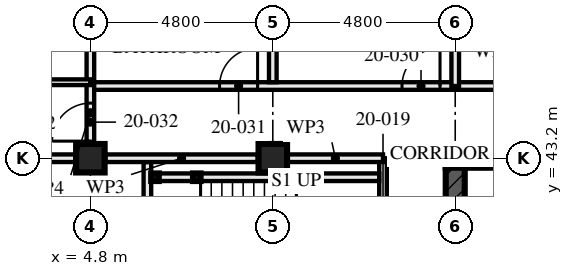
"""IFC4 building model, lengths in metres.
Left out: names, types, materials, properties, quantities, classifications, styles, units other than length and angle.
Written with IfcOpenShell. Run it as: python <this file> out.ifc"""

import sys

from ifc_helpers import new_model, si_unit, direction, frame, frame_2d, origin, origin_2d, place, context, subcontext, project, spatial, rectangle, hollow_rectangle, extrude, element, fill, save


model = new_model("IFC4")
c1 = context("Model", 3, precision=1e-05, world=origin(), true_north=direction((0.0, 1.0)))
c2 = subcontext(c1, "Body", "Model", "MODEL_VIEW")
j1 = project(units=[si_unit("LENGTHUNIT", "METRE"), si_unit("PLANEANGLEUNIT", "RADIAN")], contexts=[c1])
p1 = place(None, origin())
s1 = spatial("IfcSite", under=j1, at=p1, CompositionType="ELEMENT")
p2 = place(p1, origin())
s2 = spatial("IfcBuilding", under=s1, at=p2, CompositionType="ELEMENT")
p3 = place(p2, frame((0.0, 0.0, 76.0)))
s3 = spatial("IfcBuildingStorey", under=s2, at=p3, CompositionType="ELEMENT", Elevation=76.0)
for number, where, z_axis, x_axis in (
    (1, (4.8, 43.2, 0.0), (0.0, 0.0, 1.0), (0.0, 1.0, 0.0)),
    (2, (9.6, 43.2, 0.0), (0.0, 0.0, 1.0), (0.0, 1.0, 0.0)),
):
    element("IfcColumn", number, at=place(p3, frame(where, z_axis=z_axis, x_axis=x_axis)), inside=s3, PredefinedType="COLUMN", context=c2, shape_type="SweptSolid", body=[
        extrude(hollow_rectangle(XDim=0.75, YDim=0.75, WallThickness=0.08, at=origin_2d()), origin(), (0.0, 0.0, 1.0), 3.5),
    ])
p4 = place(p3, frame((29.05, 43.2, -0.17), z_axis=(0.0, 0.0, 1.0), x_axis=(-1.0, 0.0, 0.0)))
e3 = element("IfcWall", 3, at=p4, inside=s3, PredefinedType="SHEAR", context=c2, shape_type="SweptSolid", body=[
    extrude(rectangle(XDim=14.9, YDim=0.5, at=frame_2d((7.45, 0.0))), origin(), (0.0, 0.0, 1.0), 3.42),
])
p5 = place(p4, frame((6.85, 0.0, 0.17)))
e4 = element("IfcOpeningElement", 4, at=p5, cuts=e3, PredefinedType="OPENING", context=c2, shape_type="SweptSolid", body=[
    extrude(rectangle(XDim=1.2, YDim=2.1, at=frame_2d((0.6, 1.05))), frame((0.0, 0.26, 0.0), z_axis=(0.0, -1.0, 0.0), x_axis=(1.0, 0.0, 0.0)), (0.0, 0.0, 1.0), 0.521),
])
p6 = place(p3, frame((14.4, 42.95, -0.17), z_axis=(0.0, 0.0, 1.0), x_axis=(0.0, -1.0, 0.0)))
e5 = element("IfcWall", 5, at=p6, inside=s3, PredefinedType="SHEAR", context=c2, shape_type="SweptSolid", body=[
    extrude(rectangle(XDim=13.9, YDim=0.5, at=frame_2d((6.95, 0.0))), origin(), (0.0, 0.0, 1.0), 3.42),
])
p7 = place(p6, frame((6.35, 0.0, 0.17)))
e6 = element("IfcOpeningElement", 6, at=p7, cuts=e5, PredefinedType="OPENING", context=c2, shape_type="SweptSolid", body=[
    extrude(rectangle(XDim=1.2, YDim=2.1, at=frame_2d((0.6, 1.05))), frame((0.0, 0.26, 0.0), z_axis=(0.0, -1.0, 0.0), x_axis=(1.0, 0.0, 0.0)), (0.0, 0.0, 1.0), 0.521),
])
for number, where, z_axis, x_axis in (
    (7, (6.5, 42.7, 0.0), (0.0, 0.0, 1.0), (1.0, 0.0, 0.0)),
    (8, (7.6, 42.7, 0.0), (0.0, 0.0, 1.0), (1.0, 0.0, 0.0)),
):
    element("IfcColumn", number, at=place(p3, frame(where, z_axis=z_axis, x_axis=x_axis)), inside=s3, PredefinedType="COLUMN", context=c2, shape_type="SweptSolid", body=[
        extrude(hollow_rectangle(XDim=0.2, YDim=0.2, WallThickness=0.008, at=origin_2d()), origin(), (0.0, 0.0, 1.0), 3.25),
    ])
p8 = place(p3, frame((6.6, 42.7, 0.0), z_axis=(0.0, 0.0, 1.0), x_axis=(1.0, 0.0, 0.0)))
e9 = element("IfcWall", 9, at=p8, inside=s3, PredefinedType="SOLIDWALL", context=c2, shape_type="SweptSolid", body=[
    extrude(rectangle(XDim=0.9, YDim=0.2, at=frame_2d((0.45, 0.0))), origin(), (0.0, 0.0, 1.0), 2.94),
])
p9 = place(p3, frame((7.7, 42.7, 0.0), z_axis=(0.0, 0.0, 1.0), x_axis=(1.0, 0.0, 0.0)))
e10 = element("IfcWall", 10, at=p9, inside=s3, PredefinedType="SOLIDWALL", context=c2, shape_type="SweptSolid", body=[
    extrude(rectangle(XDim=4.7, YDim=0.2, at=frame_2d((2.35, 0.0))), origin(), (0.0, 0.0, 1.0), 2.94),
])
p10 = place(p3, frame((6.3, 43.1, 0.0), z_axis=(0.0, 0.0, 1.0), x_axis=(0.0, -1.0, 0.0)))
e11 = element("IfcWall", 11, at=p10, inside=s3, PredefinedType="SOLIDWALL", context=c2, shape_type="SweptSolid", body=[
    extrude(rectangle(XDim=3.3, YDim=0.2, at=frame_2d((1.65, 0.0))), origin(), (0.0, 0.0, 1.0), 3.25),
])
p11 = place(p3, frame((12.5, 43.2, 0.0), z_axis=(0.0, 0.0, 1.0), x_axis=(0.0, -1.0, 0.0)))
e12 = element("IfcWall", 12, at=p11, inside=s3, PredefinedType="PARTITIONING", context=c2, shape_type="SweptSolid", body=[
    extrude(rectangle(XDim=14.4, YDim=0.2, at=frame_2d((7.2, 0.0))), origin(), (0.0, 0.0, 1.0), 2.04),
])
p12 = place(p11, frame((1.4, 0.0, 0.0)))
e13 = element("IfcOpeningElement", 13, at=p12, cuts=e12, PredefinedType="OPENING", context=c2, shape_type="SweptSolid", body=[
    extrude(rectangle(XDim=1.0, YDim=2.0, at=frame_2d((0.5, 1.0))), frame((0.0, 0.111, 0.0), z_axis=(0.0, -1.0, 0.0), x_axis=(1.0, 0.0, 0.0)), (0.0, 0.0, 1.0), 0.221),
])
p13 = place(p11, frame((5.2, 0.0, 0.0)))
e14 = element("IfcOpeningElement", 14, at=p13, cuts=e12, PredefinedType="OPENING", context=c2, shape_type="SweptSolid", body=[
    extrude(rectangle(XDim=1.0, YDim=2.0, at=frame_2d((0.5, 1.0))), frame((0.0, 0.111, 0.0), z_axis=(0.0, -1.0, 0.0), x_axis=(1.0, 0.0, 0.0)), (0.0, 0.0, 1.0), 0.221),
])
p14 = place(p11, frame((10.0, 0.0, 0.0)))
e15 = element("IfcOpeningElement", 15, at=p14, cuts=e12, PredefinedType="OPENING", context=c2, shape_type="SweptSolid", body=[
    extrude(rectangle(XDim=1.0, YDim=2.0, at=frame_2d((0.5, 1.0))), frame((0.0, 0.111, 0.0), z_axis=(0.0, -1.0, 0.0), x_axis=(1.0, 0.0, 0.0)), (0.0, 0.0, 1.0), 0.221),
])
p15 = place(p3, frame((9.6, 57.28, 0.0), z_axis=(0.0, 0.0, 1.0), x_axis=(0.0, -1.0, 0.0)))
e16 = element("IfcWall", 16, at=p15, inside=s3, PredefinedType="PARTITIONING", context=c2, shape_type="SweptSolid", body=[
    extrude(rectangle(XDim=12.08, YDim=0.2, at=frame_2d((6.04, 0.0))), origin(), (0.0, 0.0, 1.0), 2.04),
])
p16 = place(p3, frame((4.8, 52.48, 0.0), z_axis=(0.0, 0.0, 1.0), x_axis=(0.0, -1.0, 0.0)))
e17 = element("IfcWall", 17, at=p16, inside=s3, PredefinedType="PARTITIONING", context=c2, shape_type="SweptSolid", body=[
    extrude(rectangle(XDim=7.28, YDim=0.2, at=frame_2d((3.64, 0.0))), origin(), (0.0, 0.0, 1.0), 2.04),
])
p17 = place(p3, frame((4.8, 45.2, 0.0), z_axis=(0.0, 0.0, 1.0), x_axis=(-1.0, 0.0, 0.0)))
e18 = element("IfcWall", 18, at=p17, inside=s3, PredefinedType="PARTITIONING", context=c2, shape_type="SweptSolid", body=[
    extrude(rectangle(XDim=2.8, YDim=0.15, at=frame_2d((1.4, 0.0))), origin(), (0.0, 0.0, 1.0), 3.25),
])
p18 = place(p3, frame((14.4, 45.1, 0.0), z_axis=(0.0, 0.0, 1.0), x_axis=(-1.0, 0.0, 0.0)))
e19 = element("IfcWall", 19, at=p18, inside=s3, PredefinedType="PARTITIONING", context=c2, shape_type="SweptSolid", body=[
    extrude(rectangle(XDim=9.6, YDim=0.2, at=frame_2d((4.8, 0.0))), origin(), (0.0, 0.0, 1.0), 3.25),
])
p19 = place(p18, frame((0.4, 0.0, 0.0)))
e20 = element("IfcOpeningElement", 20, at=p19, cuts=e19, PredefinedType="OPENING", context=c2, shape_type="SweptSolid", body=[
    extrude(rectangle(XDim=1.0, YDim=2.1, at=frame_2d((0.5, 1.05))), frame((0.0, 0.111, 0.0), z_axis=(0.0, -1.0, 0.0), x_axis=(1.0, 0.0, 0.0)), (0.0, 0.0, 1.0), 0.221),
])
p20 = place(p18, frame((5.2, 0.0, 0.0)))
e21 = element("IfcOpeningElement", 21, at=p20, cuts=e19, PredefinedType="OPENING", context=c2, shape_type="SweptSolid", body=[
    extrude(rectangle(XDim=1.0, YDim=2.1, at=frame_2d((0.5, 1.05))), frame((0.0, 0.111, 0.0), z_axis=(0.0, -1.0, 0.0), x_axis=(1.0, 0.0, 0.0)), (0.0, 0.0, 1.0), 0.221),
])
p21 = place(p3, frame((4.8, 45.2, 0.0), z_axis=(0.0, 0.0, 1.0), x_axis=(0.0, -1.0, 0.0)))
e22 = element("IfcWall", 22, at=p21, inside=s3, PredefinedType="PARTITIONING", context=c2, shape_type="SweptSolid", body=[
    extrude(rectangle(XDim=1.605, YDim=0.2, at=frame_2d((0.802, 0.0))), origin(), (0.0, 0.0, 1.0), 3.25),
])
p22 = place(p21, frame((0.55, 0.0, 0.0)))
e23 = element("IfcOpeningElement", 23, at=p22, cuts=e22, PredefinedType="OPENING", context=c2, shape_type="SweptSolid", body=[
    extrude(rectangle(XDim=1.0, YDim=2.1, at=frame_2d((0.5, 1.05))), frame((0.0, 0.111, 0.0), z_axis=(0.0, -1.0, 0.0), x_axis=(1.0, 0.0, 0.0)), (0.0, 0.0, 1.0), 0.221),
])
p23 = place(p3, frame((28.8, 45.1, 0.0), z_axis=(0.0, 0.0, 1.0), x_axis=(-1.0, 0.0, 0.0)))
e24 = element("IfcWall", 24, at=p23, inside=s3, PredefinedType="PARTITIONING", context=c2, shape_type="SweptSolid", body=[
    extrude(rectangle(XDim=14.4, YDim=0.2, at=frame_2d((7.2, 0.0))), origin(), (0.0, 0.0, 1.0), 3.25),
])
p24 = place(p23, frame((0.4, 0.0, 0.0)))
e25 = element("IfcOpeningElement", 25, at=p24, cuts=e24, PredefinedType="OPENING", context=c2, shape_type="SweptSolid", body=[
    extrude(rectangle(XDim=1.0, YDim=2.1, at=frame_2d((0.5, 1.05))), frame((0.0, 0.111, 0.0), z_axis=(0.0, -1.0, 0.0), x_axis=(1.0, 0.0, 0.0)), (0.0, 0.0, 1.0), 0.221),
])
p25 = place(p23, frame((5.2, 0.0, 0.0)))
e26 = element("IfcOpeningElement", 26, at=p25, cuts=e24, PredefinedType="OPENING", context=c2, shape_type="SweptSolid", body=[
    extrude(rectangle(XDim=1.0, YDim=2.1, at=frame_2d((0.5, 1.05))), frame((0.0, 0.111, 0.0), z_axis=(0.0, -1.0, 0.0), x_axis=(1.0, 0.0, 0.0)), (0.0, 0.0, 1.0), 0.221),
])
p26 = place(p23, frame((10.0, 0.0, 0.0)))
e27 = element("IfcOpeningElement", 27, at=p26, cuts=e24, PredefinedType="OPENING", context=c2, shape_type="SweptSolid", body=[
    extrude(rectangle(XDim=1.0, YDim=2.1, at=frame_2d((0.5, 1.05))), frame((0.0, 0.111, 0.0), z_axis=(0.0, -1.0, 0.0), x_axis=(1.0, 0.0, 0.0)), (0.0, 0.0, 1.0), 0.221),
])
p27 = place(p3, frame((12.5, 43.2, 0.0), z_axis=(0.0, 0.0, 1.0), x_axis=(-1.0, 0.0, 0.0)))
e28 = element("IfcWall", 28, at=p27, inside=s3, PredefinedType="PARTITIONING", context=c2, shape_type="SweptSolid", body=[
    extrude(rectangle(XDim=2.505, YDim=0.2, at=frame_2d((1.252, 0.0))), origin(), (0.0, 0.0, 1.0), 2.04),
])
p28 = place(p3, frame((9.205, 43.2, 0.0), z_axis=(0.0, 0.0, 1.0), x_axis=(-1.0, 0.0, 0.0)))
e29 = element("IfcWall", 29, at=p28, inside=s3, PredefinedType="PARTITIONING", context=c2, shape_type="SweptSolid", body=[
    extrude(rectangle(XDim=4.01, YDim=0.2, at=frame_2d((2.005, 0.0))), origin(), (0.0, 0.0, 1.0), 2.04),
])
p29 = place(p3, frame((4.405, 43.2, 0.0), z_axis=(0.0, 0.0, 1.0), x_axis=(-1.0, 0.0, 0.0)))
e30 = element("IfcWall", 30, at=p29, inside=s3, PredefinedType="PARTITIONING", context=c2, shape_type="SweptSolid", body=[
    extrude(rectangle(XDim=4.085, YDim=0.2, at=frame_2d((2.042, 0.0))), origin(), (0.0, 0.0, 1.0), 2.04),
])
p30 = place(p3, frame((14.4, 45.1, 0.0), z_axis=(0.0, 0.0, 1.0), x_axis=(0.0, 1.0, 0.0)))
e31 = element("IfcWall", 31, at=p30, inside=s3, PredefinedType="PARTITIONING", context=c2, shape_type="SweptSolid", body=[
    extrude(rectangle(XDim=2.555, YDim=0.2, at=frame_2d((1.277, 0.0))), origin(), (0.0, 0.0, 1.0), 2.04),
])
p31 = place(p19, frame((1.0, 0.0, 0.0), z_axis=(0.0, 0.0, 1.0), x_axis=(-1.0, 0.0, 0.0)))
e32 = element("IfcDoor", 32, at=p31, inside=s3, OperationType="SINGLE_SWING_LEFT", PredefinedType="DOOR", context=c2, shape_type="SweptSolid", body=[
    extrude(rectangle(XDim=1.0, YDim=2.1, at=frame_2d((0.5, 1.05))), frame((0.0, 0.027, 0.0), z_axis=(0.0, -1.0, 0.0), x_axis=(1.0, 0.0, 0.0)), (0.0, 0.0, 1.0), 0.054),
])
fill(e20, e32)
p32 = place(p20, frame((1.0, 0.0, 0.0), z_axis=(0.0, 0.0, 1.0), x_axis=(-1.0, 0.0, 0.0)))
e33 = element("IfcDoor", 33, at=p32, inside=s3, OperationType="SINGLE_SWING_LEFT", PredefinedType="DOOR", context=c2, shape_type="SweptSolid", body=[
    extrude(rectangle(XDim=1.0, YDim=2.1, at=frame_2d((0.5, 1.05))), frame((0.0, 0.027, 0.0), z_axis=(0.0, -1.0, 0.0), x_axis=(1.0, 0.0, 0.0)), (0.0, 0.0, 1.0), 0.054),
])
fill(e21, e33)
p33 = place(p22, frame((1.0, 0.0, 0.0), z_axis=(0.0, 0.0, 1.0), x_axis=(-1.0, 0.0, 0.0)))
e34 = element("IfcDoor", 34, at=p33, inside=s3, OperationType="SINGLE_SWING_RIGHT", PredefinedType="DOOR", context=c2, shape_type="SweptSolid", body=[
    extrude(rectangle(XDim=1.0, YDim=2.1, at=frame_2d((0.5, 1.05))), frame((0.0, 0.027, 0.0), z_axis=(0.0, -1.0, 0.0), x_axis=(1.0, 0.0, 0.0)), (0.0, 0.0, 1.0), 0.054),
])
fill(e23, e34)
save(model, sys.argv[1])
